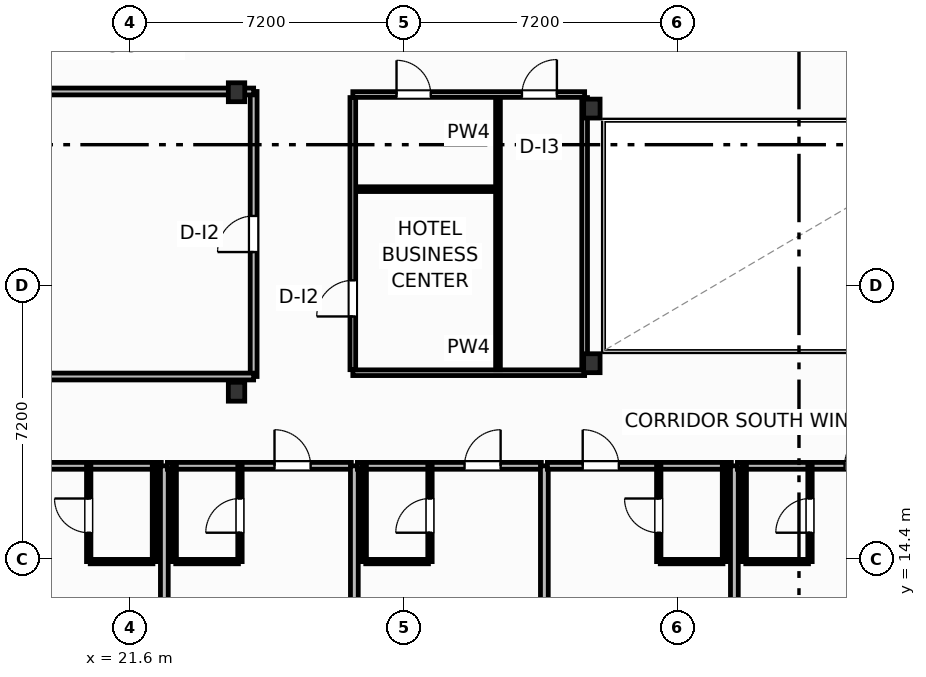
"""IFC4 building model, lengths in metres.
Left out: names, types, materials, properties, quantities, classifications, styles, units other than length and angle.
Written with IfcOpenShell. Run it as: python <this file> out.ifc"""

import sys

from ifc_helpers import new_model, si_unit, direction, frame, frame_2d, origin, origin_2d, place, context, subcontext, project, spatial, rectangle, i_section, extrude, element, fill, save


model = new_model("IFC4")
c1 = context("Model", 3, precision=1e-05, world=origin(), true_north=direction((0.0, 1.0)))
c2 = subcontext(c1, "Body", "Model", "MODEL_VIEW")
j1 = project(units=[si_unit("LENGTHUNIT", "METRE"), si_unit("PLANEANGLEUNIT", "RADIAN")], contexts=[c1])
p1 = place(None, origin())
s1 = spatial("IfcSite", under=j1, at=p1, CompositionType="ELEMENT")
p2 = place(p1, origin())
s2 = spatial("IfcBuilding", under=s1, at=p2, CompositionType="ELEMENT")
p3 = place(p2, frame((0.0, 0.0, 27.0)))
s3 = spatial("IfcBuildingStorey", under=s2, at=p3, CompositionType="ELEMENT", Elevation=27.0)
for number, where, z_axis, x_axis in (
    (1, (33.75, 19.55, 0.0), (0.0, 0.0, 1.0), (1.0, 0.0, 0.0)),
    (2, (33.75, 26.25, 0.0), (0.0, 0.0, 1.0), (1.0, 0.0, 0.0)),
    (3, (24.4, 18.8, 0.0), (0.0, 0.0, 1.0), (1.0, 0.0, 0.0)),
    (4, (24.4, 26.68, 0.0), (0.0, 0.0, 1.0), (1.0, 0.0, 0.0)),
):
    element("IfcColumn", number, at=place(p3, frame(where, z_axis=z_axis, x_axis=x_axis)), inside=s3, PredefinedType="COLUMN", context=c2, shape_type="SweptSolid", body=[
        extrude(i_section(OverallWidth=0.432, OverallDepth=0.498, WebThickness=0.056, FlangeThickness=0.089, FilletRadius=0.025, at=origin_2d()), origin(), (0.0, 0.0, 1.0), 3.7),
    ])
p4 = place(p3, frame((17.58, 16.85, 0.0), z_axis=(0.0, 0.0, 1.0), x_axis=(1.0, 0.0, 0.0)))
e5 = element("IfcWall", 5, at=p4, inside=s3, PredefinedType="PARTITIONING", context=c2, shape_type="SweptSolid", body=[
    extrude(rectangle(XDim=4.84, YDim=0.18, at=frame_2d((2.42, 0.0))), origin(), (0.0, 0.0, 1.0), 3.45),
])
p5 = place(p4, frame((0.929, 0.0, 0.0)))
e6 = element("IfcOpeningElement", 6, at=p5, cuts=e5, PredefinedType="OPENING", context=c2, shape_type="SweptSolid", body=[
    extrude(rectangle(XDim=0.95, YDim=2.15, at=frame_2d((0.475, 1.075))), frame((0.0, 0.1, 0.0), z_axis=(0.0, -1.0, 0.0), x_axis=(1.0, 0.0, 0.0)), (0.0, 0.0, 1.0), 0.2),
])
p6 = place(p3, frame((20.55, 14.33, 0.0), z_axis=(0.0, 0.0, 1.0), x_axis=(1.0, 0.0, 0.0)))
e7 = element("IfcWall", 7, at=p6, inside=s3, PredefinedType="PARTITIONING", context=c2, shape_type="SweptSolid", body=[
    extrude(rectangle(XDim=1.65, YDim=0.115, at=frame_2d((0.825, 0.0))), origin(), (0.0, 0.0, 1.0), 3.45),
])
p7 = place(p3, frame((20.51, 14.33, 0.0), z_axis=(0.0, 0.0, 1.0), x_axis=(0.0, 1.0, 0.0)))
e8 = element("IfcWall", 8, at=p7, inside=s3, PredefinedType="PARTITIONING", context=c2, shape_type="SweptSolid", body=[
    extrude(rectangle(XDim=2.52, YDim=0.115, at=frame_2d((1.26, 0.0))), origin(), (0.0, 0.0, 1.0), 3.45),
])
p8 = place(p7, frame((0.76, 0.0, 0.0)))
e9 = element("IfcOpeningElement", 9, at=p8, cuts=e8, PredefinedType="OPENING", context=c2, shape_type="SweptSolid", body=[
    extrude(rectangle(XDim=0.9, YDim=2.05, at=frame_2d((0.45, 1.025))), frame((0.0, 0.067, 0.0), z_axis=(0.0, -1.0, 0.0), x_axis=(1.0, 0.0, 0.0)), (0.0, 0.0, 1.0), 0.135),
])
p9 = place(p3, frame((22.24, 14.33, 0.0), z_axis=(0.0, 0.0, 1.0), x_axis=(0.0, 1.0, 0.0)))
e10 = element("IfcWall", 10, at=p9, inside=s3, PredefinedType="PARTITIONING", context=c2, shape_type="SweptSolid", body=[
    extrude(rectangle(XDim=2.52, YDim=0.115, at=frame_2d((1.26, 0.0))), origin(), (0.0, 0.0, 1.0), 3.45),
])
p10 = place(p3, frame((22.5, 8.802, 0.0), z_axis=(0.0, 0.0, 1.0), x_axis=(0.0, 1.0, 0.0)))
e11 = element("IfcWall", 11, at=p10, inside=s3, PredefinedType="PARTITIONING", context=c2, shape_type="SweptSolid", body=[
    extrude(rectangle(XDim=8.048, YDim=0.205, at=frame_2d((4.024, 0.0))), origin(), (0.0, 0.0, 1.0), 3.45),
])
p11 = place(p3, frame((22.58, 16.85, 0.0), z_axis=(0.0, 0.0, 1.0), x_axis=(1.0, 0.0, 0.0)))
e12 = element("IfcWall", 12, at=p11, inside=s3, PredefinedType="PARTITIONING", context=c2, shape_type="SweptSolid", body=[
    extrude(rectangle(XDim=4.84, YDim=0.18, at=frame_2d((2.42, 0.0))), origin(), (0.0, 0.0, 1.0), 3.45),
])
p12 = place(p11, frame((2.819, 0.0, 0.0)))
e13 = element("IfcOpeningElement", 13, at=p12, cuts=e12, PredefinedType="OPENING", context=c2, shape_type="SweptSolid", body=[
    extrude(rectangle(XDim=0.95, YDim=2.15, at=frame_2d((0.475, 1.075))), frame((0.0, 0.1, 0.0), z_axis=(0.0, -1.0, 0.0), x_axis=(1.0, 0.0, 0.0)), (0.0, 0.0, 1.0), 0.2),
])
p13 = place(p3, frame((22.8, 14.33, 0.0), z_axis=(0.0, 0.0, 1.0), x_axis=(1.0, 0.0, 0.0)))
e14 = element("IfcWall", 14, at=p13, inside=s3, PredefinedType="PARTITIONING", context=c2, shape_type="SweptSolid", body=[
    extrude(rectangle(XDim=1.65, YDim=0.115, at=frame_2d((0.825, 0.0))), origin(), (0.0, 0.0, 1.0), 3.45),
])
p14 = place(p3, frame((24.49, 14.33, 0.0), z_axis=(0.0, 0.0, 1.0), x_axis=(0.0, 1.0, 0.0)))
e15 = element("IfcWall", 15, at=p14, inside=s3, PredefinedType="PARTITIONING", context=c2, shape_type="SweptSolid", body=[
    extrude(rectangle(XDim=2.52, YDim=0.115, at=frame_2d((1.26, 0.0))), origin(), (0.0, 0.0, 1.0), 3.45),
])
p15 = place(p14, frame((0.76, 0.0, 0.0)))
e16 = element("IfcOpeningElement", 16, at=p15, cuts=e15, PredefinedType="OPENING", context=c2, shape_type="SweptSolid", body=[
    extrude(rectangle(XDim=0.9, YDim=2.05, at=frame_2d((0.45, 1.025))), frame((0.0, 0.067, 0.0), z_axis=(0.0, -1.0, 0.0), x_axis=(1.0, 0.0, 0.0)), (0.0, 0.0, 1.0), 0.135),
])
p16 = place(p3, frame((22.76, 14.33, 0.0), z_axis=(0.0, 0.0, 1.0), x_axis=(0.0, 1.0, 0.0)))
e17 = element("IfcWall", 17, at=p16, inside=s3, PredefinedType="PARTITIONING", context=c2, shape_type="SweptSolid", body=[
    extrude(rectangle(XDim=2.52, YDim=0.115, at=frame_2d((1.26, 0.0))), origin(), (0.0, 0.0, 1.0), 3.45),
])
p17 = place(p3, frame((27.5, 2.808, 0.0), z_axis=(0.0, 0.0, 1.0), x_axis=(0.0, 1.0, 0.0)))
e18 = element("IfcWall", 18, at=p17, inside=s3, PredefinedType="PARTITIONING", context=c2, shape_type="SweptSolid", body=[
    extrude(rectangle(XDim=14.042, YDim=0.205, at=frame_2d((7.021, 0.0))), origin(), (0.0, 0.0, 1.0), 3.45),
])
p18 = place(p3, frame((27.58, 16.85, 0.0), z_axis=(0.0, 0.0, 1.0), x_axis=(1.0, 0.0, 0.0)))
e19 = element("IfcWall", 19, at=p18, inside=s3, PredefinedType="PARTITIONING", context=c2, shape_type="SweptSolid", body=[
    extrude(rectangle(XDim=4.84, YDim=0.18, at=frame_2d((2.42, 0.0))), origin(), (0.0, 0.0, 1.0), 3.45),
])
p19 = place(p18, frame((2.819, 0.0, 0.0)))
e20 = element("IfcOpeningElement", 20, at=p19, cuts=e19, PredefinedType="OPENING", context=c2, shape_type="SweptSolid", body=[
    extrude(rectangle(XDim=0.95, YDim=2.15, at=frame_2d((0.475, 1.075))), frame((0.0, 0.1, 0.0), z_axis=(0.0, -1.0, 0.0), x_axis=(1.0, 0.0, 0.0)), (0.0, 0.0, 1.0), 0.2),
])
p20 = place(p3, frame((27.8, 14.33, 0.0), z_axis=(0.0, 0.0, 1.0), x_axis=(1.0, 0.0, 0.0)))
e21 = element("IfcWall", 21, at=p20, inside=s3, PredefinedType="PARTITIONING", context=c2, shape_type="SweptSolid", body=[
    extrude(rectangle(XDim=1.65, YDim=0.115, at=frame_2d((0.825, 0.0))), origin(), (0.0, 0.0, 1.0), 3.45),
])
p21 = place(p3, frame((29.49, 14.33, 0.0), z_axis=(0.0, 0.0, 1.0), x_axis=(0.0, 1.0, 0.0)))
e22 = element("IfcWall", 22, at=p21, inside=s3, PredefinedType="PARTITIONING", context=c2, shape_type="SweptSolid", body=[
    extrude(rectangle(XDim=2.52, YDim=0.115, at=frame_2d((1.26, 0.0))), origin(), (0.0, 0.0, 1.0), 3.45),
])
p22 = place(p21, frame((0.76, 0.0, 0.0)))
e23 = element("IfcOpeningElement", 23, at=p22, cuts=e22, PredefinedType="OPENING", context=c2, shape_type="SweptSolid", body=[
    extrude(rectangle(XDim=0.9, YDim=2.05, at=frame_2d((0.45, 1.025))), frame((0.0, 0.067, 0.0), z_axis=(0.0, -1.0, 0.0), x_axis=(1.0, 0.0, 0.0)), (0.0, 0.0, 1.0), 0.135),
])
p23 = place(p3, frame((27.76, 14.33, 0.0), z_axis=(0.0, 0.0, 1.0), x_axis=(0.0, 1.0, 0.0)))
e24 = element("IfcWall", 24, at=p23, inside=s3, PredefinedType="PARTITIONING", context=c2, shape_type="SweptSolid", body=[
    extrude(rectangle(XDim=2.52, YDim=0.115, at=frame_2d((1.26, 0.0))), origin(), (0.0, 0.0, 1.0), 3.45),
])
p24 = place(p3, frame((32.5, 1.914, 0.0), z_axis=(0.0, 0.0, 1.0), x_axis=(0.0, 1.0, 0.0)))
e25 = element("IfcWall", 25, at=p24, inside=s3, PredefinedType="PARTITIONING", context=c2, shape_type="SweptSolid", body=[
    extrude(rectangle(XDim=14.936, YDim=0.205, at=frame_2d((7.468, 0.0))), origin(), (0.0, 0.0, 1.0), 2.58),
])
p25 = place(p3, frame((32.58, 16.85, 0.0), z_axis=(0.0, 0.0, 1.0), x_axis=(1.0, 0.0, 0.0)))
e26 = element("IfcWall", 26, at=p25, inside=s3, PredefinedType="PARTITIONING", context=c2, shape_type="SweptSolid", body=[
    extrude(rectangle(XDim=4.84, YDim=0.18, at=frame_2d((2.42, 0.0))), origin(), (0.0, 0.0, 1.0), 3.45),
])
p26 = place(p25, frame((0.929, 0.0, 0.0)))
e27 = element("IfcOpeningElement", 27, at=p26, cuts=e26, PredefinedType="OPENING", context=c2, shape_type="SweptSolid", body=[
    extrude(rectangle(XDim=0.95, YDim=2.15, at=frame_2d((0.475, 1.075))), frame((0.0, 0.1, 0.0), z_axis=(0.0, -1.0, 0.0), x_axis=(1.0, 0.0, 0.0)), (0.0, 0.0, 1.0), 0.2),
])
p27 = place(p3, frame((35.55, 14.33, 0.0), z_axis=(0.0, 0.0, 1.0), x_axis=(1.0, 0.0, 0.0)))
e28 = element("IfcWall", 28, at=p27, inside=s3, PredefinedType="PARTITIONING", context=c2, shape_type="SweptSolid", body=[
    extrude(rectangle(XDim=1.65, YDim=0.115, at=frame_2d((0.825, 0.0))), origin(), (0.0, 0.0, 1.0), 3.45),
])
p28 = place(p3, frame((35.51, 14.33, 0.0), z_axis=(0.0, 0.0, 1.0), x_axis=(0.0, 1.0, 0.0)))
e29 = element("IfcWall", 29, at=p28, inside=s3, PredefinedType="PARTITIONING", context=c2, shape_type="SweptSolid", body=[
    extrude(rectangle(XDim=2.52, YDim=0.115, at=frame_2d((1.26, 0.0))), origin(), (0.0, 0.0, 1.0), 3.45),
])
p29 = place(p28, frame((0.76, 0.0, 0.0)))
e30 = element("IfcOpeningElement", 30, at=p29, cuts=e29, PredefinedType="OPENING", context=c2, shape_type="SweptSolid", body=[
    extrude(rectangle(XDim=0.9, YDim=2.05, at=frame_2d((0.45, 1.025))), frame((0.0, 0.067, 0.0), z_axis=(0.0, -1.0, 0.0), x_axis=(1.0, 0.0, 0.0)), (0.0, 0.0, 1.0), 0.135),
])
p30 = place(p3, frame((37.24, 14.33, 0.0), z_axis=(0.0, 0.0, 1.0), x_axis=(0.0, 1.0, 0.0)))
e31 = element("IfcWall", 31, at=p30, inside=s3, PredefinedType="PARTITIONING", context=c2, shape_type="SweptSolid", body=[
    extrude(rectangle(XDim=2.52, YDim=0.115, at=frame_2d((1.26, 0.0))), origin(), (0.0, 0.0, 1.0), 3.45),
])
p31 = place(p3, frame((37.5, -4.0, 0.0), z_axis=(0.0, 0.0, 1.0), x_axis=(0.0, 1.0, 0.0)))
e32 = element("IfcWall", 32, at=p31, inside=s3, PredefinedType="PARTITIONING", context=c2, shape_type="SweptSolid", body=[
    extrude(rectangle(XDim=20.85, YDim=0.205, at=frame_2d((10.425, 0.0))), origin(), (0.0, 0.0, 1.0), 3.45),
])
p32 = place(p3, frame((37.58, 16.85, 0.0), z_axis=(0.0, 0.0, 1.0), x_axis=(1.0, 0.0, 0.0)))
e33 = element("IfcWall", 33, at=p32, inside=s3, PredefinedType="PARTITIONING", context=c2, shape_type="SweptSolid", body=[
    extrude(rectangle(XDim=4.84, YDim=0.18, at=frame_2d((2.42, 0.0))), origin(), (0.0, 0.0, 1.0), 3.45),
])
p33 = place(p32, frame((2.819, 0.0, 0.0)))
e34 = element("IfcOpeningElement", 34, at=p33, cuts=e33, PredefinedType="OPENING", context=c2, shape_type="SweptSolid", body=[
    extrude(rectangle(XDim=0.95, YDim=2.15, at=frame_2d((0.475, 1.075))), frame((0.0, 0.1, 0.0), z_axis=(0.0, -1.0, 0.0), x_axis=(1.0, 0.0, 0.0)), (0.0, 0.0, 1.0), 0.2),
])
p34 = place(p3, frame((37.8, 14.33, 0.0), z_axis=(0.0, 0.0, 1.0), x_axis=(1.0, 0.0, 0.0)))
e35 = element("IfcWall", 35, at=p34, inside=s3, PredefinedType="PARTITIONING", context=c2, shape_type="SweptSolid", body=[
    extrude(rectangle(XDim=1.65, YDim=0.115, at=frame_2d((0.825, 0.0))), origin(), (0.0, 0.0, 1.0), 3.45),
])
p35 = place(p3, frame((39.49, 14.33, 0.0), z_axis=(0.0, 0.0, 1.0), x_axis=(0.0, 1.0, 0.0)))
e36 = element("IfcWall", 36, at=p35, inside=s3, PredefinedType="PARTITIONING", context=c2, shape_type="SweptSolid", body=[
    extrude(rectangle(XDim=2.52, YDim=0.115, at=frame_2d((1.26, 0.0))), origin(), (0.0, 0.0, 1.0), 3.45),
])
p36 = place(p35, frame((0.76, 0.0, 0.0)))
e37 = element("IfcOpeningElement", 37, at=p36, cuts=e36, PredefinedType="OPENING", context=c2, shape_type="SweptSolid", body=[
    extrude(rectangle(XDim=0.9, YDim=2.05, at=frame_2d((0.45, 1.025))), frame((0.0, 0.067, 0.0), z_axis=(0.0, -1.0, 0.0), x_axis=(1.0, 0.0, 0.0)), (0.0, 0.0, 1.0), 0.135),
])
p37 = place(p3, frame((37.76, 14.33, 0.0), z_axis=(0.0, 0.0, 1.0), x_axis=(0.0, 1.0, 0.0)))
e38 = element("IfcWall", 38, at=p37, inside=s3, PredefinedType="PARTITIONING", context=c2, shape_type="SweptSolid", body=[
    extrude(rectangle(XDim=2.52, YDim=0.115, at=frame_2d((1.26, 0.0))), origin(), (0.0, 0.0, 1.0), 3.45),
])
p38 = place(p3, frame((24.85, 19.2, 0.0), z_axis=(0.0, 0.0, 1.0), x_axis=(0.0, 1.0, 0.0)))
e39 = element("IfcWall", 39, at=p38, inside=s3, PredefinedType="PARTITIONING", context=c2, shape_type="SweptSolid", body=[
    extrude(rectangle(XDim=7.5, YDim=0.18, at=frame_2d((3.75, 0.0))), origin(), (0.0, 0.0, 1.0), 3.45),
])
p39 = place(p38, frame((3.275, 0.0, 0.0)))
e40 = element("IfcOpeningElement", 40, at=p39, cuts=e39, PredefinedType="OPENING", context=c2, shape_type="SweptSolid", body=[
    extrude(rectangle(XDim=0.95, YDim=2.05, at=frame_2d((0.475, 1.025))), frame((0.0, 0.1, 0.0), z_axis=(0.0, -1.0, 0.0), x_axis=(1.0, 0.0, 0.0)), (0.0, 0.0, 1.0), 0.2),
])
p40 = place(p3, frame((3.703, 19.2, 0.0), z_axis=(0.0, 0.0, 1.0), x_axis=(1.0, 0.0, 0.0)))
e41 = element("IfcWall", 41, at=p40, inside=s3, PredefinedType="PARTITIONING", context=c2, shape_type="SweptSolid", body=[
    extrude(rectangle(XDim=21.147, YDim=0.18, at=frame_2d((10.574, 0.0))), origin(), (0.0, 0.0, 1.0), 2.58),
])
p41 = place(p3, frame((0.2, 26.7, 0.0), z_axis=(0.0, 0.0, 1.0), x_axis=(1.0, 0.0, 0.0)))
e42 = element("IfcWall", 42, at=p41, inside=s3, PredefinedType="PARTITIONING", context=c2, shape_type="SweptSolid", body=[
    extrude(rectangle(XDim=24.65, YDim=0.18, at=frame_2d((12.325, 0.0))), origin(), (0.0, 0.0, 1.0), 2.662),
])
p42 = place(p3, frame((27.46, 19.3, 0.0), z_axis=(0.0, 0.0, 1.0), x_axis=(1.0, 0.0, 0.0)))
e43 = element("IfcWall", 43, at=p42, inside=s3, PredefinedType="PARTITIONING", context=c2, shape_type="SweptSolid", body=[
    extrude(rectangle(XDim=6.1, YDim=0.15, at=frame_2d((3.05, 0.0))), origin(), (0.0, 0.0, 1.0), 2.662),
])
p43 = place(p3, frame((27.46, 26.62, 0.0), z_axis=(0.0, 0.0, 1.0), x_axis=(1.0, 0.0, 0.0)))
e44 = element("IfcWall", 44, at=p43, inside=s3, PredefinedType="PARTITIONING", context=c2, shape_type="SweptSolid", body=[
    extrude(rectangle(XDim=6.1, YDim=0.15, at=frame_2d((3.05, 0.0))), origin(), (0.0, 0.0, 1.0), 2.662),
])
p44 = place(p43, frame((1.15, 0.0, 0.0)))
e45 = element("IfcOpeningElement", 45, at=p44, cuts=e44, PredefinedType="OPENING", context=c2, shape_type="SweptSolid", body=[
    extrude(rectangle(XDim=0.9, YDim=2.05, at=frame_2d((0.45, 1.025))), frame((0.0, 0.085, 0.0), z_axis=(0.0, -1.0, 0.0), x_axis=(1.0, 0.0, 0.0)), (0.0, 0.0, 1.0), 0.17),
])
p45 = place(p43, frame((4.45, 0.0, 0.0)))
e46 = element("IfcOpeningElement", 46, at=p45, cuts=e44, PredefinedType="OPENING", context=c2, shape_type="SweptSolid", body=[
    extrude(rectangle(XDim=0.92, YDim=2.05, at=frame_2d((0.46, 1.025))), frame((0.0, 0.085, 0.0), z_axis=(0.0, -1.0, 0.0), x_axis=(1.0, 0.0, 0.0)), (0.0, 0.0, 1.0), 0.17),
])
p46 = place(p3, frame((31.28, 19.38, 0.0), z_axis=(0.0, 0.0, 1.0), x_axis=(0.0, 1.0, 0.0)))
e47 = element("IfcWall", 47, at=p46, inside=s3, PredefinedType="PARTITIONING", context=c2, shape_type="SweptSolid", body=[
    extrude(rectangle(XDim=7.16, YDim=0.125, at=frame_2d((3.58, 0.0))), origin(), (0.0, 0.0, 1.0), 3.45),
])
p47 = place(p3, frame((27.52, 24.13, 0.0), z_axis=(0.0, 0.0, 1.0), x_axis=(1.0, 0.0, 0.0)))
e48 = element("IfcWall", 48, at=p47, inside=s3, PredefinedType="PARTITIONING", context=c2, shape_type="SweptSolid", body=[
    extrude(rectangle(XDim=3.7, YDim=0.125, at=frame_2d((1.85, 0.0))), origin(), (0.0, 0.0, 1.0), 3.45),
])
p48 = place(p3, frame((27.46, 19.38, 0.0), z_axis=(0.0, 0.0, 1.0), x_axis=(0.0, 1.0, 0.0)))
e49 = element("IfcWall", 49, at=p48, inside=s3, PredefinedType="PARTITIONING", context=c2, shape_type="SweptSolid", body=[
    extrude(rectangle(XDim=7.16, YDim=0.15, at=frame_2d((3.58, 0.0))), origin(), (0.0, 0.0, 1.0), 3.45),
])
p49 = place(p48, frame((1.4, 0.0, 0.0)))
e50 = element("IfcOpeningElement", 50, at=p49, cuts=e49, PredefinedType="OPENING", context=c2, shape_type="SweptSolid", body=[
    extrude(rectangle(XDim=0.95, YDim=2.05, at=frame_2d((0.475, 1.025))), frame((0.0, 0.085, 0.0), z_axis=(0.0, -1.0, 0.0), x_axis=(1.0, 0.0, 0.0)), (0.0, 0.0, 1.0), 0.17),
])
p50 = place(p3, frame((33.56, 19.38, 0.0), z_axis=(0.0, 0.0, 1.0), x_axis=(0.0, 1.0, 0.0)))
e51 = element("IfcWall", 51, at=p50, inside=s3, PredefinedType="PARTITIONING", context=c2, shape_type="SweptSolid", body=[
    extrude(rectangle(XDim=7.16, YDim=0.15, at=frame_2d((3.58, 0.0))), origin(), (0.0, 0.0, 1.0), 2.824),
])
p51 = place(p8, origin())
e52 = element("IfcDoor", 52, at=p51, inside=s3, OperationType="SINGLE_SWING_RIGHT", PredefinedType="DOOR", context=c2, shape_type="SweptSolid", body=[
    extrude(rectangle(XDim=0.9, YDim=2.05, at=frame_2d((0.45, 1.025))), frame((0.0, 0.025, 0.0), z_axis=(0.0, -1.0, 0.0), x_axis=(1.0, 0.0, 0.0)), (0.0, 0.0, 1.0), 0.05),
])
fill(e9, e52)
p52 = place(p12, origin())
e53 = element("IfcDoor", 53, at=p52, inside=s3, OperationType="SINGLE_SWING_LEFT", PredefinedType="DOOR", context=c2, shape_type="SweptSolid", body=[
    extrude(rectangle(XDim=0.95, YDim=2.15, at=frame_2d((0.475, 1.075))), frame((0.0, 0.025, 0.0), z_axis=(0.0, -1.0, 0.0), x_axis=(1.0, 0.0, 0.0)), (0.0, 0.0, 1.0), 0.05),
])
fill(e13, e53)
p53 = place(p15, origin())
e54 = element("IfcDoor", 54, at=p53, inside=s3, OperationType="SINGLE_SWING_LEFT", PredefinedType="DOOR", context=c2, shape_type="SweptSolid", body=[
    extrude(rectangle(XDim=0.9, YDim=2.05, at=frame_2d((0.45, 1.025))), frame((0.0, 0.025, 0.0), z_axis=(0.0, -1.0, 0.0), x_axis=(1.0, 0.0, 0.0)), (0.0, 0.0, 1.0), 0.05),
])
fill(e16, e54)
p54 = place(p19, origin())
e55 = element("IfcDoor", 55, at=p54, inside=s3, OperationType="SINGLE_SWING_RIGHT", PredefinedType="DOOR", context=c2, shape_type="SweptSolid", body=[
    extrude(rectangle(XDim=0.95, YDim=2.15, at=frame_2d((0.475, 1.075))), frame((0.0, 0.025, 0.0), z_axis=(0.0, -1.0, 0.0), x_axis=(1.0, 0.0, 0.0)), (0.0, 0.0, 1.0), 0.05),
])
fill(e20, e55)
p55 = place(p22, origin())
e56 = element("IfcDoor", 56, at=p55, inside=s3, OperationType="SINGLE_SWING_LEFT", PredefinedType="DOOR", context=c2, shape_type="SweptSolid", body=[
    extrude(rectangle(XDim=0.9, YDim=2.05, at=frame_2d((0.45, 1.025))), frame((0.0, 0.025, 0.0), z_axis=(0.0, -1.0, 0.0), x_axis=(1.0, 0.0, 0.0)), (0.0, 0.0, 1.0), 0.05),
])
fill(e23, e56)
p56 = place(p26, origin())
e57 = element("IfcDoor", 57, at=p56, inside=s3, OperationType="SINGLE_SWING_LEFT", PredefinedType="DOOR", context=c2, shape_type="SweptSolid", body=[
    extrude(rectangle(XDim=0.95, YDim=2.15, at=frame_2d((0.475, 1.075))), frame((0.0, 0.025, 0.0), z_axis=(0.0, -1.0, 0.0), x_axis=(1.0, 0.0, 0.0)), (0.0, 0.0, 1.0), 0.05),
])
fill(e27, e57)
p57 = place(p29, origin())
e58 = element("IfcDoor", 58, at=p57, inside=s3, OperationType="SINGLE_SWING_RIGHT", PredefinedType="DOOR", context=c2, shape_type="SweptSolid", body=[
    extrude(rectangle(XDim=0.9, YDim=2.05, at=frame_2d((0.45, 1.025))), frame((0.0, 0.025, 0.0), z_axis=(0.0, -1.0, 0.0), x_axis=(1.0, 0.0, 0.0)), (0.0, 0.0, 1.0), 0.05),
])
fill(e30, e58)
p58 = place(p33, origin())
e59 = element("IfcDoor", 59, at=p58, inside=s3, OperationType="SINGLE_SWING_RIGHT", PredefinedType="DOOR", context=c2, shape_type="SweptSolid", body=[
    extrude(rectangle(XDim=0.95, YDim=2.15, at=frame_2d((0.475, 1.075))), frame((0.0, 0.025, 0.0), z_axis=(0.0, -1.0, 0.0), x_axis=(1.0, 0.0, 0.0)), (0.0, 0.0, 1.0), 0.05),
])
fill(e34, e59)
p59 = place(p36, origin())
e60 = element("IfcDoor", 60, at=p59, inside=s3, OperationType="SINGLE_SWING_LEFT", PredefinedType="DOOR", context=c2, shape_type="SweptSolid", body=[
    extrude(rectangle(XDim=0.9, YDim=2.05, at=frame_2d((0.45, 1.025))), frame((0.0, 0.025, 0.0), z_axis=(0.0, -1.0, 0.0), x_axis=(1.0, 0.0, 0.0)), (0.0, 0.0, 1.0), 0.05),
])
fill(e37, e60)
p60 = place(p39, origin())
e61 = element("IfcDoor", 61, at=p60, inside=s3, OperationType="SINGLE_SWING_LEFT", PredefinedType="DOOR", context=c2, shape_type="SweptSolid", body=[
    extrude(rectangle(XDim=0.95, YDim=2.05, at=frame_2d((0.475, 1.025))), frame((0.0, 0.025, 0.0), z_axis=(0.0, -1.0, 0.0), x_axis=(1.0, 0.0, 0.0)), (0.0, 0.0, 1.0), 0.05),
])
fill(e40, e61)
p61 = place(p44, origin())
e62 = element("IfcDoor", 62, at=p61, inside=s3, OperationType="SINGLE_SWING_LEFT", PredefinedType="DOOR", context=c2, shape_type="SweptSolid", body=[
    extrude(rectangle(XDim=0.9, YDim=2.05, at=frame_2d((0.45, 1.025))), frame((0.0, 0.025, 0.0), z_axis=(0.0, -1.0, 0.0), x_axis=(1.0, 0.0, 0.0)), (0.0, 0.0, 1.0), 0.05),
])
fill(e45, e62)
p62 = place(p45, origin())
e63 = element("IfcDoor", 63, at=p62, inside=s3, OperationType="SINGLE_SWING_RIGHT", PredefinedType="DOOR", context=c2, shape_type="SweptSolid", body=[
    extrude(rectangle(XDim=0.92, YDim=2.05, at=frame_2d((0.46, 1.025))), frame((0.0, 0.025, 0.0), z_axis=(0.0, -1.0, 0.0), x_axis=(1.0, 0.0, 0.0)), (0.0, 0.0, 1.0), 0.05),
])
fill(e46, e63)
p63 = place(p49, origin())
e64 = element("IfcDoor", 64, at=p63, inside=s3, OperationType="SINGLE_SWING_LEFT", PredefinedType="DOOR", context=c2, shape_type="SweptSolid", body=[
    extrude(rectangle(XDim=0.95, YDim=2.05, at=frame_2d((0.475, 1.025))), frame((0.0, 0.025, 0.0), z_axis=(0.0, -1.0, 0.0), x_axis=(1.0, 0.0, 0.0)), (0.0, 0.0, 1.0), 0.05),
])
fill(e50, e64)
save(model, sys.argv[1])
